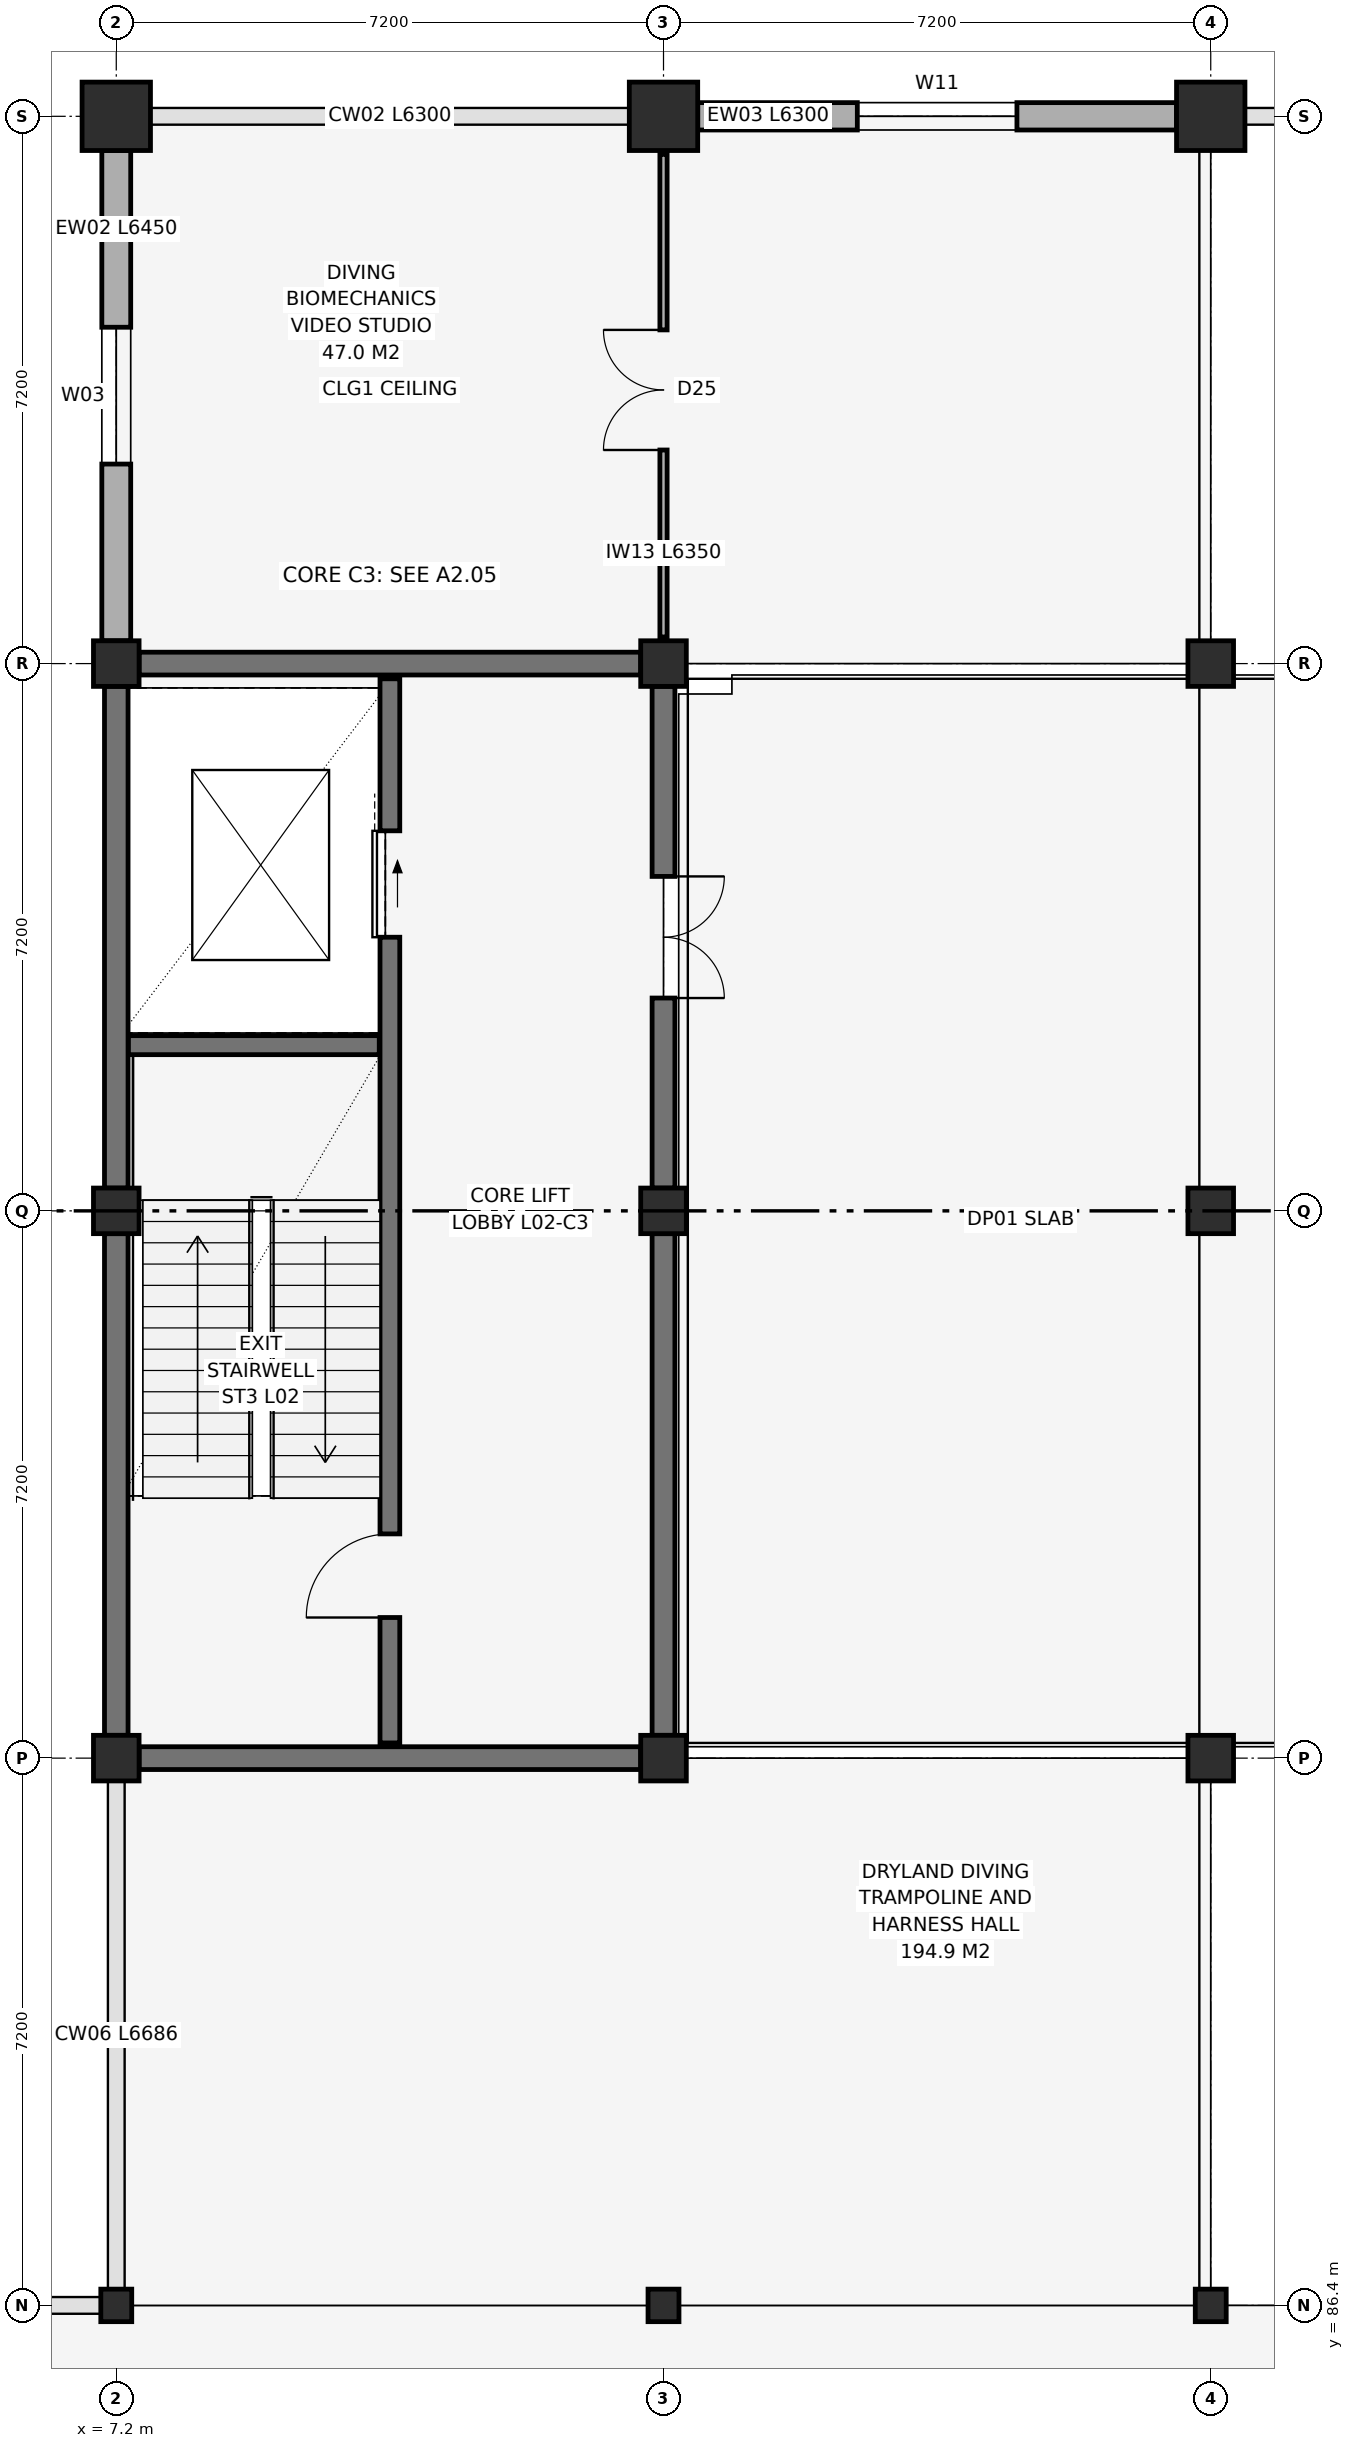
"""IFC4 building model, lengths in metres.
Left out: names, types, materials, properties, quantities, classifications, styles, units other than length and angle.
Written with IfcOpenShell. Run it as: python <this file> out.ifc"""

import sys

from ifc_helpers import new_model, si_unit, direction, frame, frame_2d, origin, origin_2d, place, context, subcontext, project, spatial, rectangle, i_section, extrude, element, fill, save


model = new_model("IFC4")
c1 = context("Model", 3, precision=1e-05, world=origin(), true_north=direction((0.0, 1.0)))
c2 = subcontext(c1, "Body", "Model", "MODEL_VIEW")
j1 = project(units=[si_unit("LENGTHUNIT", "METRE"), si_unit("PLANEANGLEUNIT", "RADIAN")], contexts=[c1])
p1 = place(None, origin())
s1 = spatial("IfcSite", under=j1, at=p1, CompositionType="ELEMENT")
p2 = place(p1, origin())
s2 = spatial("IfcBuilding", under=s1, at=p2, CompositionType="ELEMENT")
p3 = place(p2, frame((0.0, 0.0, 10.2)))
s3 = spatial("IfcBuildingStorey", under=s2, at=p3, CompositionType="ELEMENT", Elevation=10.2)
p4 = place(p3, frame((7.2, 86.4, 0.0), z_axis=(0.0, 0.0, 1.0), x_axis=(1.0, 0.0, 0.0)))
e1 = element("IfcColumn", 1, at=p4, inside=s3, PredefinedType="COLUMN", context=c2, shape_type="SweptSolid", body=[
    extrude(i_section(OverallWidth=0.407, OverallDepth=0.428, WebThickness=0.02, FlangeThickness=0.035, FilletRadius=0.022, at=origin_2d()), origin(), (0.0, 0.0, 1.0), 4.8),
])
for number, where, z_axis, x_axis in (
    (2, (7.2, 93.6, 0.0), (0.0, 0.0, 1.0), (1.0, 0.0, 0.0)),
    (3, (7.2, 100.8, 0.0), (0.0, 0.0, 1.0), (1.0, 0.0, 0.0)),
    (4, (7.2, 108.0, 0.0), (0.0, 0.0, 1.0), (1.0, 0.0, 0.0)),
):
    element("IfcColumn", number, at=place(p3, frame(where, z_axis=z_axis, x_axis=x_axis)), inside=s3, PredefinedType="COLUMN", context=c2, shape_type="SweptSolid", body=[
        extrude(rectangle(XDim=0.6, YDim=0.6, at=origin_2d()), origin(), (0.0, 0.0, 1.0), 4.8),
    ])
p5 = place(p3, frame((7.2, 115.2, 0.0), z_axis=(0.0, 0.0, 1.0), x_axis=(1.0, 0.0, 0.0)))
e5 = element("IfcColumn", 5, at=p5, inside=s3, PredefinedType="COLUMN", context=c2, shape_type="SweptSolid", body=[
    extrude(rectangle(XDim=0.9, YDim=0.9, at=origin_2d()), origin(), (0.0, 0.0, 1.0), 4.8),
])
p6 = place(p3, frame((14.4, 86.4, 0.0), z_axis=(0.0, 0.0, 1.0), x_axis=(1.0, 0.0, 0.0)))
e6 = element("IfcColumn", 6, at=p6, inside=s3, PredefinedType="COLUMN", context=c2, shape_type="SweptSolid", body=[
    extrude(i_section(OverallWidth=0.407, OverallDepth=0.428, WebThickness=0.02, FlangeThickness=0.035, FilletRadius=0.022, at=origin_2d()), origin(), (0.0, 0.0, 1.0), 4.8),
])
for number, where, z_axis, x_axis in (
    (7, (14.4, 93.6, 0.0), (0.0, 0.0, 1.0), (1.0, 0.0, 0.0)),
    (8, (14.4, 100.8, 0.0), (0.0, 0.0, 1.0), (1.0, 0.0, 0.0)),
    (9, (14.4, 108.0, 0.0), (0.0, 0.0, 1.0), (1.0, 0.0, 0.0)),
):
    element("IfcColumn", number, at=place(p3, frame(where, z_axis=z_axis, x_axis=x_axis)), inside=s3, PredefinedType="COLUMN", context=c2, shape_type="SweptSolid", body=[
        extrude(rectangle(XDim=0.6, YDim=0.6, at=origin_2d()), origin(), (0.0, 0.0, 1.0), 4.8),
    ])
p7 = place(p3, frame((14.4, 115.2, 0.0), z_axis=(0.0, 0.0, 1.0), x_axis=(1.0, 0.0, 0.0)))
e10 = element("IfcColumn", 10, at=p7, inside=s3, PredefinedType="COLUMN", context=c2, shape_type="SweptSolid", body=[
    extrude(rectangle(XDim=0.9, YDim=0.9, at=origin_2d()), origin(), (0.0, 0.0, 1.0), 4.8),
])
p8 = place(p3, frame((21.6, 86.4, 0.0), z_axis=(0.0, 0.0, 1.0), x_axis=(1.0, 0.0, 0.0)))
e11 = element("IfcColumn", 11, at=p8, inside=s3, PredefinedType="COLUMN", context=c2, shape_type="SweptSolid", body=[
    extrude(i_section(OverallWidth=0.407, OverallDepth=0.428, WebThickness=0.02, FlangeThickness=0.035, FilletRadius=0.022, at=origin_2d()), origin(), (0.0, 0.0, 1.0), 4.8),
])
for number, where, z_axis, x_axis in (
    (12, (21.6, 93.6, 0.0), (0.0, 0.0, 1.0), (1.0, 0.0, 0.0)),
    (13, (21.6, 100.8, 0.0), (0.0, 0.0, 1.0), (1.0, 0.0, 0.0)),
    (14, (21.6, 108.0, 0.0), (0.0, 0.0, 1.0), (1.0, 0.0, 0.0)),
):
    element("IfcColumn", number, at=place(p3, frame(where, z_axis=z_axis, x_axis=x_axis)), inside=s3, PredefinedType="COLUMN", context=c2, shape_type="SweptSolid", body=[
        extrude(rectangle(XDim=0.6, YDim=0.6, at=origin_2d()), origin(), (0.0, 0.0, 1.0), 4.8),
    ])
p9 = place(p3, frame((21.6, 115.2, 0.0), z_axis=(0.0, 0.0, 1.0), x_axis=(1.0, 0.0, 0.0)))
e15 = element("IfcColumn", 15, at=p9, inside=s3, PredefinedType="COLUMN", context=c2, shape_type="SweptSolid", body=[
    extrude(rectangle(XDim=0.9, YDim=0.9, at=origin_2d()), origin(), (0.0, 0.0, 1.0), 4.8),
])
p10 = place(p3, frame((14.85, 115.2, 0.0), z_axis=(0.0, 0.0, 1.0), x_axis=(1.0, 0.0, 0.0)))
e16 = element("IfcWall", 16, at=p10, inside=s3, PredefinedType="SOLIDWALL", context=c2, shape_type="SweptSolid", body=[
    extrude(rectangle(XDim=6.3, YDim=0.36, at=frame_2d((3.15, 0.0))), origin(), (0.0, 0.0, 1.0), 4.56),
])
p11 = place(p10, frame((2.1, 0.0, 0.95)))
e17 = element("IfcOpeningElement", 17, at=p11, cuts=e16, PredefinedType="OPENING", context=c2, shape_type="SweptSolid", body=[
    extrude(rectangle(XDim=2.1, YDim=1.75, at=frame_2d((1.05, 0.875))), frame((0.0, 0.195, 0.0), z_axis=(0.0, -1.0, 0.0), x_axis=(1.0, 0.0, 0.0)), (0.0, 0.0, 1.0), 0.39),
])
p12 = place(p3, frame((7.2, 108.3, 0.0), z_axis=(0.0, 0.0, 1.0), x_axis=(0.0, 1.0, 0.0)))
e18 = element("IfcWall", 18, at=p12, inside=s3, PredefinedType="SOLIDWALL", context=c2, shape_type="SweptSolid", body=[
    extrude(rectangle(XDim=6.45, YDim=0.38, at=frame_2d((3.225, 0.0))), origin(), (0.0, 0.0, 1.0), 4.072),
])
p13 = place(p12, frame((2.325, 0.0, 0.95)))
e19 = element("IfcOpeningElement", 19, at=p13, cuts=e18, PredefinedType="OPENING", context=c2, shape_type="SweptSolid", body=[
    extrude(rectangle(XDim=1.8, YDim=2.2, at=frame_2d((0.9, 1.1))), frame((0.0, 0.205, 0.0), z_axis=(0.0, -1.0, 0.0), x_axis=(1.0, 0.0, 0.0)), (0.0, 0.0, 1.0), 0.41),
])
for number, where, z_axis, x_axis in (
    (20, (7.5, 93.6, 0.0), (0.0, 0.0, 1.0), (1.0, 0.0, 0.0)),
    (21, (7.5, 108.0, 0.0), (0.0, 0.0, 1.0), (1.0, 0.0, 0.0)),
):
    element("IfcWall", number, at=place(p3, frame(where, z_axis=z_axis, x_axis=x_axis)), inside=s3, PredefinedType="SHEAR", context=c2, shape_type="SweptSolid", body=[
        extrude(rectangle(XDim=6.6, YDim=0.3, at=frame_2d((3.3, 0.0))), origin(), (0.0, 0.0, 1.0), 4.56),
    ])
p14 = place(p3, frame((7.2, 93.9, 0.0), z_axis=(0.0, 0.0, 1.0), x_axis=(0.0, 1.0, 0.0)))
e22 = element("IfcWall", 22, at=p14, inside=s3, PredefinedType="SHEAR", context=c2, shape_type="SweptSolid", body=[
    extrude(rectangle(XDim=6.6, YDim=0.31, at=frame_2d((3.3, 0.0))), origin(), (0.0, 0.0, 1.0), 4.56),
])
p15 = place(p3, frame((7.2, 101.1, 0.0), z_axis=(0.0, 0.0, 1.0), x_axis=(0.0, 1.0, 0.0)))
e23 = element("IfcWall", 23, at=p15, inside=s3, PredefinedType="SHEAR", context=c2, shape_type="SweptSolid", body=[
    extrude(rectangle(XDim=6.6, YDim=0.31, at=frame_2d((3.3, 0.0))), origin(), (0.0, 0.0, 1.0), 4.56),
])
p16 = place(p3, frame((14.4, 93.9, 0.0), z_axis=(0.0, 0.0, 1.0), x_axis=(0.0, 1.0, 0.0)))
e24 = element("IfcWall", 24, at=p16, inside=s3, PredefinedType="SHEAR", context=c2, shape_type="SweptSolid", body=[
    extrude(rectangle(XDim=6.6, YDim=0.3, at=frame_2d((3.3, 0.0))), origin(), (0.0, 0.0, 1.0), 4.56),
])
p17 = place(p3, frame((14.4, 101.1, 0.0), z_axis=(0.0, 0.0, 1.0), x_axis=(0.0, 1.0, 0.0)))
e25 = element("IfcWall", 25, at=p17, inside=s3, PredefinedType="SHEAR", context=c2, shape_type="SweptSolid", body=[
    extrude(rectangle(XDim=6.6, YDim=0.3, at=frame_2d((3.3, 0.0))), origin(), (0.0, 0.0, 1.0), 4.56),
])
p18 = place(p17, frame((2.5, 0.0, 0.0)))
e26 = element("IfcOpeningElement", 26, at=p18, cuts=e25, PredefinedType="OPENING", context=c2, shape_type="SweptSolid", body=[
    extrude(rectangle(XDim=1.6, YDim=2.2, at=frame_2d((0.8, 1.1))), frame((0.0, 0.165, 0.0), z_axis=(0.0, -1.0, 0.0), x_axis=(1.0, 0.0, 0.0)), (0.0, 0.0, 1.0), 0.33),
])
p19 = place(p3, frame((10.8, 93.8, 0.0), z_axis=(0.0, 0.0, 1.0), x_axis=(0.0, 1.0, 0.0)))
e27 = element("IfcWall", 27, at=p19, inside=s3, PredefinedType="SHEAR", context=c2, shape_type="SweptSolid", body=[
    extrude(rectangle(XDim=14.0, YDim=0.26, at=frame_2d((7.0, 0.0))), origin(), (0.0, 0.0, 1.0), 4.56),
])
p20 = place(p19, frame((1.65, 0.0, 0.0)))
e28 = element("IfcOpeningElement", 28, at=p20, cuts=e27, PredefinedType="OPENING", context=c2, shape_type="SweptSolid", body=[
    extrude(rectangle(XDim=1.1, YDim=2.15, at=frame_2d((0.55, 1.075))), frame((0.0, 0.145, 0.0), z_axis=(0.0, -1.0, 0.0), x_axis=(1.0, 0.0, 0.0)), (0.0, 0.0, 1.0), 0.29),
])
p21 = place(p19, frame((10.6, 0.0, 0.0)))
e29 = element("IfcOpeningElement", 29, at=p21, cuts=e27, PredefinedType="OPENING", context=c2, shape_type="SweptSolid", body=[
    extrude(rectangle(XDim=1.4, YDim=2.3, at=frame_2d((0.7, 1.15))), frame((0.0, 0.145, 0.0), z_axis=(0.0, -1.0, 0.0), x_axis=(1.0, 0.0, 0.0)), (0.0, 0.0, 1.0), 0.29),
])
p22 = place(p3, frame((7.36, 102.98, 0.0), z_axis=(0.0, 0.0, 1.0), x_axis=(1.0, 0.0, 0.0)))
e30 = element("IfcWall", 30, at=p22, inside=s3, PredefinedType="SHEAR", context=c2, shape_type="SweptSolid", body=[
    extrude(rectangle(XDim=3.3, YDim=0.25, at=frame_2d((1.65, 0.0))), origin(), (0.0, 0.0, 1.0), 4.56),
])
p23 = place(p3, frame((14.4, 108.35, 0.0), z_axis=(0.0, 0.0, 1.0), x_axis=(0.0, 1.0, 0.0)))
e31 = element("IfcWall", 31, at=p23, inside=s3, PredefinedType="PARTITIONING", context=c2, shape_type="SweptSolid", body=[
    extrude(rectangle(XDim=6.35, YDim=0.095, at=frame_2d((3.175, 0.0))), origin(), (0.0, 0.0, 1.0), 4.56),
])
p24 = place(p23, frame((2.46, 0.0, 0.0)))
e32 = element("IfcOpeningElement", 32, at=p24, cuts=e31, PredefinedType="OPENING", context=c2, shape_type="SweptSolid", body=[
    extrude(rectangle(XDim=1.58, YDim=2.25, at=frame_2d((0.79, 1.125))), frame((0.0, 0.062, 0.0), z_axis=(0.0, -1.0, 0.0), x_axis=(1.0, 0.0, 0.0)), (0.0, 0.0, 1.0), 0.125),
])
p25 = place(p11, origin())
e33 = element("IfcWindow", 33, at=p25, inside=s3, PartitioningType="SINGLE_PANEL", PredefinedType="WINDOW", context=c2, shape_type="SweptSolid", body=[
    extrude(rectangle(XDim=2.1, YDim=1.75, at=frame_2d((1.05, 0.875))), frame((0.0, 0.03, 0.0), z_axis=(0.0, -1.0, 0.0), x_axis=(1.0, 0.0, 0.0)), (0.0, 0.0, 1.0), 0.06),
])
fill(e17, e33)
p26 = place(p13, origin())
e34 = element("IfcWindow", 34, at=p26, inside=s3, PartitioningType="SINGLE_PANEL", PredefinedType="WINDOW", context=c2, shape_type="SweptSolid", body=[
    extrude(rectangle(XDim=1.8, YDim=2.2, at=frame_2d((0.9, 1.1))), frame((0.0, 0.03, 0.0), z_axis=(0.0, -1.0, 0.0), x_axis=(1.0, 0.0, 0.0)), (0.0, 0.0, 1.0), 0.06),
])
fill(e19, e34)
p27 = place(p20, origin())
e35 = element("IfcDoor", 35, at=p27, inside=s3, OperationType="SINGLE_SWING_LEFT", PredefinedType="DOOR", context=c2, shape_type="SweptSolid", body=[
    extrude(rectangle(XDim=1.1, YDim=2.15, at=frame_2d((0.55, 1.075))), frame((0.0, 0.025, 0.0), z_axis=(0.0, -1.0, 0.0), x_axis=(1.0, 0.0, 0.0)), (0.0, 0.0, 1.0), 0.05),
])
fill(e28, e35)
p28 = place(p21, frame((1.4, 0.0, 0.0), z_axis=(0.0, 0.0, 1.0), x_axis=(-1.0, 0.0, 0.0)))
e36 = element("IfcDoor", 36, at=p28, inside=s3, OperationType="SLIDING_TO_RIGHT", PredefinedType="DOOR", context=c2, shape_type="SweptSolid", body=[
    extrude(rectangle(XDim=1.4, YDim=2.3, at=frame_2d((0.7, 1.15))), frame((0.0, 0.025, 0.0), z_axis=(0.0, -1.0, 0.0), x_axis=(1.0, 0.0, 0.0)), (0.0, 0.0, 1.0), 0.05),
])
fill(e29, e36)
p29 = place(p18, frame((1.6, 0.0, 0.0), z_axis=(0.0, 0.0, 1.0), x_axis=(-1.0, 0.0, 0.0)))
e37 = element("IfcDoor", 37, at=p29, inside=s3, OperationType="DOUBLE_SWING_LEFT", PredefinedType="DOOR", context=c2, shape_type="SweptSolid", body=[
    extrude(rectangle(XDim=1.6, YDim=2.2, at=frame_2d((0.8, 1.1))), frame((0.0, 0.025, 0.0), z_axis=(0.0, -1.0, 0.0), x_axis=(1.0, 0.0, 0.0)), (0.0, 0.0, 1.0), 0.05),
])
fill(e26, e37)
p30 = place(p24, origin())
e38 = element("IfcDoor", 38, at=p30, inside=s3, OperationType="DOUBLE_SWING_LEFT", PredefinedType="DOOR", context=c2, shape_type="SweptSolid", body=[
    extrude(rectangle(XDim=1.58, YDim=2.25, at=frame_2d((0.79, 1.125))), frame((0.0, 0.025, 0.0), z_axis=(0.0, -1.0, 0.0), x_axis=(1.0, 0.0, 0.0)), (0.0, 0.0, 1.0), 0.05),
])
fill(e32, e38)
save(model, sys.argv[1])
